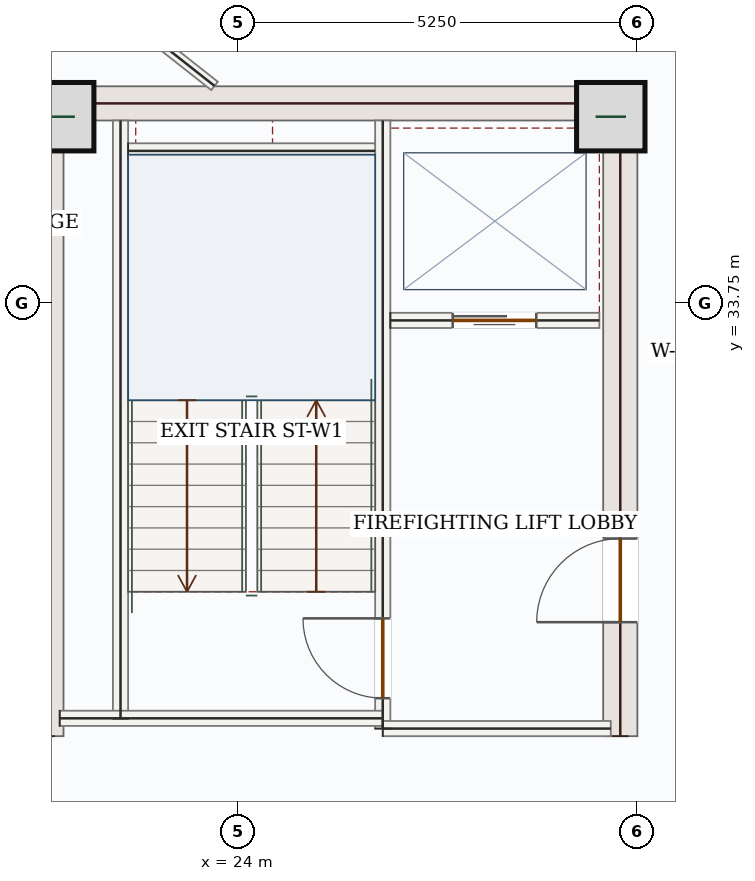
"""IFC4 building model, lengths in metres.
Left out: names, types, materials, properties, quantities, classifications, styles, units other than length and angle.
Written with IfcOpenShell. Run it as: python <this file> out.ifc"""

import sys

from ifc_helpers import new_model, si_unit, direction, frame, frame_2d, origin, origin_2d, place, context, subcontext, project, spatial, rectangle, extrude, source, transform, mapped, element, fill, save


model = new_model("IFC4")
c1 = context("Model", 3, precision=1e-05, world=origin(), true_north=direction((0.0, 1.0)))
c2 = subcontext(c1, "Body", "Model", "MODEL_VIEW")
j1 = project(units=[si_unit("LENGTHUNIT", "METRE"), si_unit("PLANEANGLEUNIT", "RADIAN")], contexts=[c1])
p1 = place(None, origin())
s1 = spatial("IfcSite", under=j1, at=p1, CompositionType="ELEMENT")
p2 = place(p1, origin())
s2 = spatial("IfcBuilding", under=s1, at=p2, CompositionType="ELEMENT")
p3 = place(p2, frame((0.0, 0.0, 323.55)))
s3 = spatial("IfcBuildingStorey", under=s2, at=p3, CompositionType="ELEMENT", Elevation=323.55)
m1 = source(origin(), c2, "Body", "SweptSolid", [
    extrude(rectangle(XDim=8.55, YDim=0.45, at=frame_2d((4.275, 0.0))), origin(), (0.0, 0.0, 1.0), 3.5),
])
p4 = place(p3, frame((21.475, 28.05, 0.0), z_axis=(0.0, 0.0, 1.0), x_axis=(0.0, 1.0, 0.0)))
e1 = element("IfcWall", 1, at=p4, inside=s3, PredefinedType="SHEAR", context=c2, shape_type="MappedRepresentation", body=[
    mapped(m1, transform((0.0, 0.0, 0.0), x_axis=(1.0, 0.0, 0.0), y_axis=(0.0, 1.0, 0.0), z_axis=(0.0, 0.0, 1.0), scale=1.0)),
])
p5 = place(p3, frame((29.025, 28.05, 0.0), z_axis=(0.0, 0.0, 1.0), x_axis=(0.0, 1.0, 0.0)))
e2 = element("IfcWall", 2, at=p5, inside=s3, PredefinedType="SHEAR", context=c2, shape_type="SweptSolid", body=[
    extrude(rectangle(XDim=8.55, YDim=0.45, at=frame_2d((4.275, 0.0))), origin(), (0.0, 0.0, 1.0), 3.5),
])
p6 = place(p5, frame((1.5, 0.0, 0.0)))
e3 = element("IfcOpeningElement", 3, at=p6, cuts=e2, PredefinedType="OPENING", context=c2, shape_type="SweptSolid", body=[
    extrude(rectangle(XDim=1.1, YDim=2.2, at=frame_2d((0.55, 1.1))), frame((0.0, 0.235, 0.0), z_axis=(0.0, -1.0, 0.0), x_axis=(1.0, 0.0, 0.0)), (0.0, 0.0, 1.0), 0.47),
])
m2 = source(origin(), c2, "Body", "SweptSolid", [
    extrude(rectangle(XDim=7.1, YDim=0.45, at=frame_2d((3.55, 0.0))), origin(), (0.0, 0.0, 1.0), 3.5),
])
p7 = place(p3, frame((21.7, 36.375, 0.0), z_axis=(0.0, 0.0, 1.0), x_axis=(1.0, 0.0, 0.0)))
e4 = element("IfcWall", 4, at=p7, inside=s3, PredefinedType="SHEAR", context=c2, shape_type="MappedRepresentation", body=[
    mapped(m2, transform((0.0, 0.0, 0.0), x_axis=(1.0, 0.0, 0.0), y_axis=(0.0, 1.0, 0.0), z_axis=(0.0, 0.0, 1.0), scale=1.0)),
])
m3 = source(origin(), c2, "Body", "SweptSolid", [
    extrude(rectangle(XDim=0.9, YDim=0.9, at=origin_2d()), origin(), (0.0, 0.0, 1.0), 3.75),
])
for number, where, z_axis, x_axis in (
    (5, (21.65, 36.2, 0.0), (0.0, 0.0, 1.0), (1.0, 0.0, 0.0)),
    (6, (28.9, 36.2, 0.0), (0.0, 0.0, 1.0), (1.0, 0.0, 0.0)),
):
    element("IfcColumn", number, at=place(p3, frame(where, z_axis=z_axis, x_axis=x_axis)), inside=s3, PredefinedType="COLUMN", context=c2, shape_type="MappedRepresentation", body=[
        mapped(m3, transform((0.0, 0.0, 0.0), x_axis=(1.0, 0.0, 0.0), y_axis=(0.0, 1.0, 0.0), z_axis=(0.0, 0.0, 1.0), scale=1.0)),
    ])
p8 = place(p3, frame((18.94, 35.542, 0.0), z_axis=(0.0, 0.0, 1.0), x_axis=(0.707106781187, 0.707106781187, 0.0)))
e7 = element("IfcWall", 7, at=p8, inside=s3, PredefinedType="SOLIDWALL", context=c2, shape_type="SweptSolid", body=[
    extrude(rectangle(XDim=3.963, YDim=0.28, at=frame_2d((1.982, 0.0))), origin(), (0.0, 0.0, 1.0), 3.5),
])
p9 = place(p8, frame((1.232, 0.0, 0.85)))
e8 = element("IfcOpeningElement", 8, at=p9, cuts=e7, PredefinedType="OPENING", context=c2, shape_type="SweptSolid", body=[
    extrude(rectangle(XDim=1.5, YDim=1.5, at=frame_2d((0.75, 0.75))), frame((0.0, 0.15, 0.0), z_axis=(0.0, -1.0, 0.0), x_axis=(1.0, 0.0, 0.0)), (0.0, 0.0, 1.0), 0.3),
])
m4 = source(origin(), c2, "Body", "SweptSolid", [
    extrude(rectangle(XDim=7.87, YDim=0.2, at=frame_2d((3.935, 0.0))), origin(), (0.0, 0.0, 1.0), 3.5),
])
p10 = place(p3, frame((22.45, 28.28, 0.0), z_axis=(0.0, 0.0, 1.0), x_axis=(0.0, 1.0, 0.0)))
e9 = element("IfcWall", 9, at=p10, inside=s3, PredefinedType="SOLIDWALL", context=c2, shape_type="MappedRepresentation", body=[
    mapped(m4, transform((0.0, 0.0, 0.0), x_axis=(1.0, 0.0, 0.0), y_axis=(0.0, 1.0, 0.0), z_axis=(0.0, 0.0, 1.0), scale=1.0)),
])
p11 = place(p3, frame((25.9, 28.15, 0.0), z_axis=(0.0, 0.0, 1.0), x_axis=(0.0, 1.0, 0.0)))
e10 = element("IfcWall", 10, at=p11, inside=s3, PredefinedType="SOLIDWALL", context=c2, shape_type="SweptSolid", body=[
    extrude(rectangle(XDim=8.0, YDim=0.2, at=frame_2d((4.0, 0.0))), origin(), (0.0, 0.0, 1.0), 3.5),
])
p12 = place(p11, frame((0.4, 0.0, 0.0)))
e11 = element("IfcOpeningElement", 11, at=p12, cuts=e10, PredefinedType="OPENING", context=c2, shape_type="SweptSolid", body=[
    extrude(rectangle(XDim=1.05, YDim=2.15, at=frame_2d((0.525, 1.075))), frame((0.0, 0.11, 0.0), z_axis=(0.0, -1.0, 0.0), x_axis=(1.0, 0.0, 0.0)), (0.0, 0.0, 1.0), 0.22),
])
m5 = source(origin(), c2, "Body", "SweptSolid", [
    extrude(rectangle(XDim=4.25, YDim=0.2, at=frame_2d((2.125, 0.0))), origin(), (0.0, 0.0, 1.0), 3.5),
])
p13 = place(p3, frame((21.65, 28.285, 0.0), z_axis=(0.0, 0.0, 1.0), x_axis=(1.0, 0.0, 0.0)))
e12 = element("IfcWall", 12, at=p13, inside=s3, PredefinedType="SOLIDWALL", context=c2, shape_type="MappedRepresentation", body=[
    mapped(m5, transform((0.0, 0.0, 0.0), x_axis=(1.0, 0.0, 0.0), y_axis=(0.0, 1.0, 0.0), z_axis=(0.0, 0.0, 1.0), scale=1.0)),
])
m6 = source(origin(), c2, "Body", "SweptSolid", [
    extrude(rectangle(XDim=3.0, YDim=0.2, at=frame_2d((1.5, 0.0))), origin(), (0.0, 0.0, 1.0), 3.5),
])
p14 = place(p3, frame((25.9, 28.15, 0.0), z_axis=(0.0, 0.0, 1.0), x_axis=(1.0, 0.0, 0.0)))
e13 = element("IfcWall", 13, at=p14, inside=s3, PredefinedType="SOLIDWALL", context=c2, shape_type="MappedRepresentation", body=[
    mapped(m6, transform((0.0, 0.0, 0.0), x_axis=(1.0, 0.0, 0.0), y_axis=(0.0, 1.0, 0.0), z_axis=(0.0, 0.0, 1.0), scale=1.0)),
])
m7 = source(origin(), c2, "Body", "SweptSolid", [
    extrude(rectangle(XDim=3.25, YDim=0.2, at=frame_2d((1.625, 0.0))), origin(), (0.0, 0.0, 1.0), 3.5),
])
p15 = place(p3, frame((22.55, 35.75, 0.0), z_axis=(0.0, 0.0, 1.0), x_axis=(1.0, 0.0, 0.0)))
e14 = element("IfcWall", 14, at=p15, inside=s3, PredefinedType="SOLIDWALL", context=c2, shape_type="MappedRepresentation", body=[
    mapped(m7, transform((0.0, 0.0, 0.0), x_axis=(1.0, 0.0, 0.0), y_axis=(0.0, 1.0, 0.0), z_axis=(0.0, 0.0, 1.0), scale=1.0)),
])
p16 = place(p3, frame((26.0, 33.52, 0.0), z_axis=(0.0, 0.0, 1.0), x_axis=(1.0, 0.0, 0.0)))
e15 = element("IfcWall", 15, at=p16, inside=s3, PredefinedType="SOLIDWALL", context=c2, shape_type="SweptSolid", body=[
    extrude(rectangle(XDim=2.75, YDim=0.2, at=frame_2d((1.375, 0.0))), origin(), (0.0, 0.0, 1.0), 3.5),
])
p17 = place(p16, frame((0.82, 0.0, 0.0)))
e16 = element("IfcOpeningElement", 16, at=p17, cuts=e15, PredefinedType="OPENING", context=c2, shape_type="SweptSolid", body=[
    extrude(rectangle(XDim=1.1, YDim=2.15, at=frame_2d((0.55, 1.075))), frame((0.0, 0.11, 0.0), z_axis=(0.0, -1.0, 0.0), x_axis=(1.0, 0.0, 0.0)), (0.0, 0.0, 1.0), 0.22),
])
m8 = source(origin(), c2, "Body", "SweptSolid", [
    extrude(rectangle(XDim=2.477, YDim=0.14, at=frame_2d((1.239, 0.0))), origin(), (0.0, 0.0, 1.0), 3.5),
])
p18 = place(p3, frame((21.742, 38.138, 0.0), z_axis=(0.0, 0.0, 1.0), x_axis=(0.785339198937, -0.619065701371, 0.0)))
e17 = element("IfcWall", 17, at=p18, inside=s3, PredefinedType="PARTITIONING", context=c2, shape_type="MappedRepresentation", body=[
    mapped(m8, transform((0.0, 0.0, 0.0), x_axis=(1.0, 0.0, 0.0), y_axis=(0.0, 1.0, 0.0), z_axis=(0.0, 0.0, 1.0), scale=1.0)),
])
m9 = source(origin(), c2, "Body", "SweptSolid", [
    extrude(rectangle(XDim=1.05, YDim=2.15, at=frame_2d((0.525, 1.075))), frame((0.0, 0.025, 0.0), z_axis=(0.0, -1.0, 0.0), x_axis=(1.0, 0.0, 0.0)), (0.0, 0.0, 1.0), 0.05),
])
p19 = place(p12, origin())
e18 = element("IfcDoor", 18, at=p19, inside=s3, OperationType="SINGLE_SWING_RIGHT", PredefinedType="DOOR", context=c2, shape_type="MappedRepresentation", body=[
    mapped(m9, transform((0.0, 0.0, 0.0), x_axis=(1.0, 0.0, 0.0), y_axis=(0.0, 1.0, 0.0), z_axis=(0.0, 0.0, 1.0), scale=1.0)),
])
fill(e11, e18)
m10 = source(origin(), c2, "Body", "SweptSolid", [
    extrude(rectangle(XDim=1.1, YDim=2.15, at=frame_2d((0.55, 1.075))), frame((0.0, 0.025, 0.0), z_axis=(0.0, -1.0, 0.0), x_axis=(1.0, 0.0, 0.0)), (0.0, 0.0, 1.0), 0.05),
])
p20 = place(p17, origin())
e19 = element("IfcDoor", 19, at=p20, inside=s3, OperationType="DOUBLE_DOOR_SLIDING", PredefinedType="DOOR", context=c2, shape_type="MappedRepresentation", body=[
    mapped(m10, transform((0.0, 0.0, 0.0), x_axis=(1.0, 0.0, 0.0), y_axis=(0.0, 1.0, 0.0), z_axis=(0.0, 0.0, 1.0), scale=1.0)),
])
fill(e16, e19)
m11 = source(origin(), c2, "Body", "SweptSolid", [
    extrude(rectangle(XDim=1.1, YDim=2.2, at=frame_2d((0.55, 1.1))), frame((0.0, 0.025, 0.0), z_axis=(0.0, -1.0, 0.0), x_axis=(1.0, 0.0, 0.0)), (0.0, 0.0, 1.0), 0.05),
])
p21 = place(p6, origin())
e20 = element("IfcDoor", 20, at=p21, inside=s3, OperationType="SINGLE_SWING_LEFT", PredefinedType="DOOR", context=c2, shape_type="MappedRepresentation", body=[
    mapped(m11, transform((0.0, 0.0, 0.0), x_axis=(1.0, 0.0, 0.0), y_axis=(0.0, 1.0, 0.0), z_axis=(0.0, 0.0, 1.0), scale=1.0)),
])
fill(e3, e20)
save(model, sys.argv[1])
